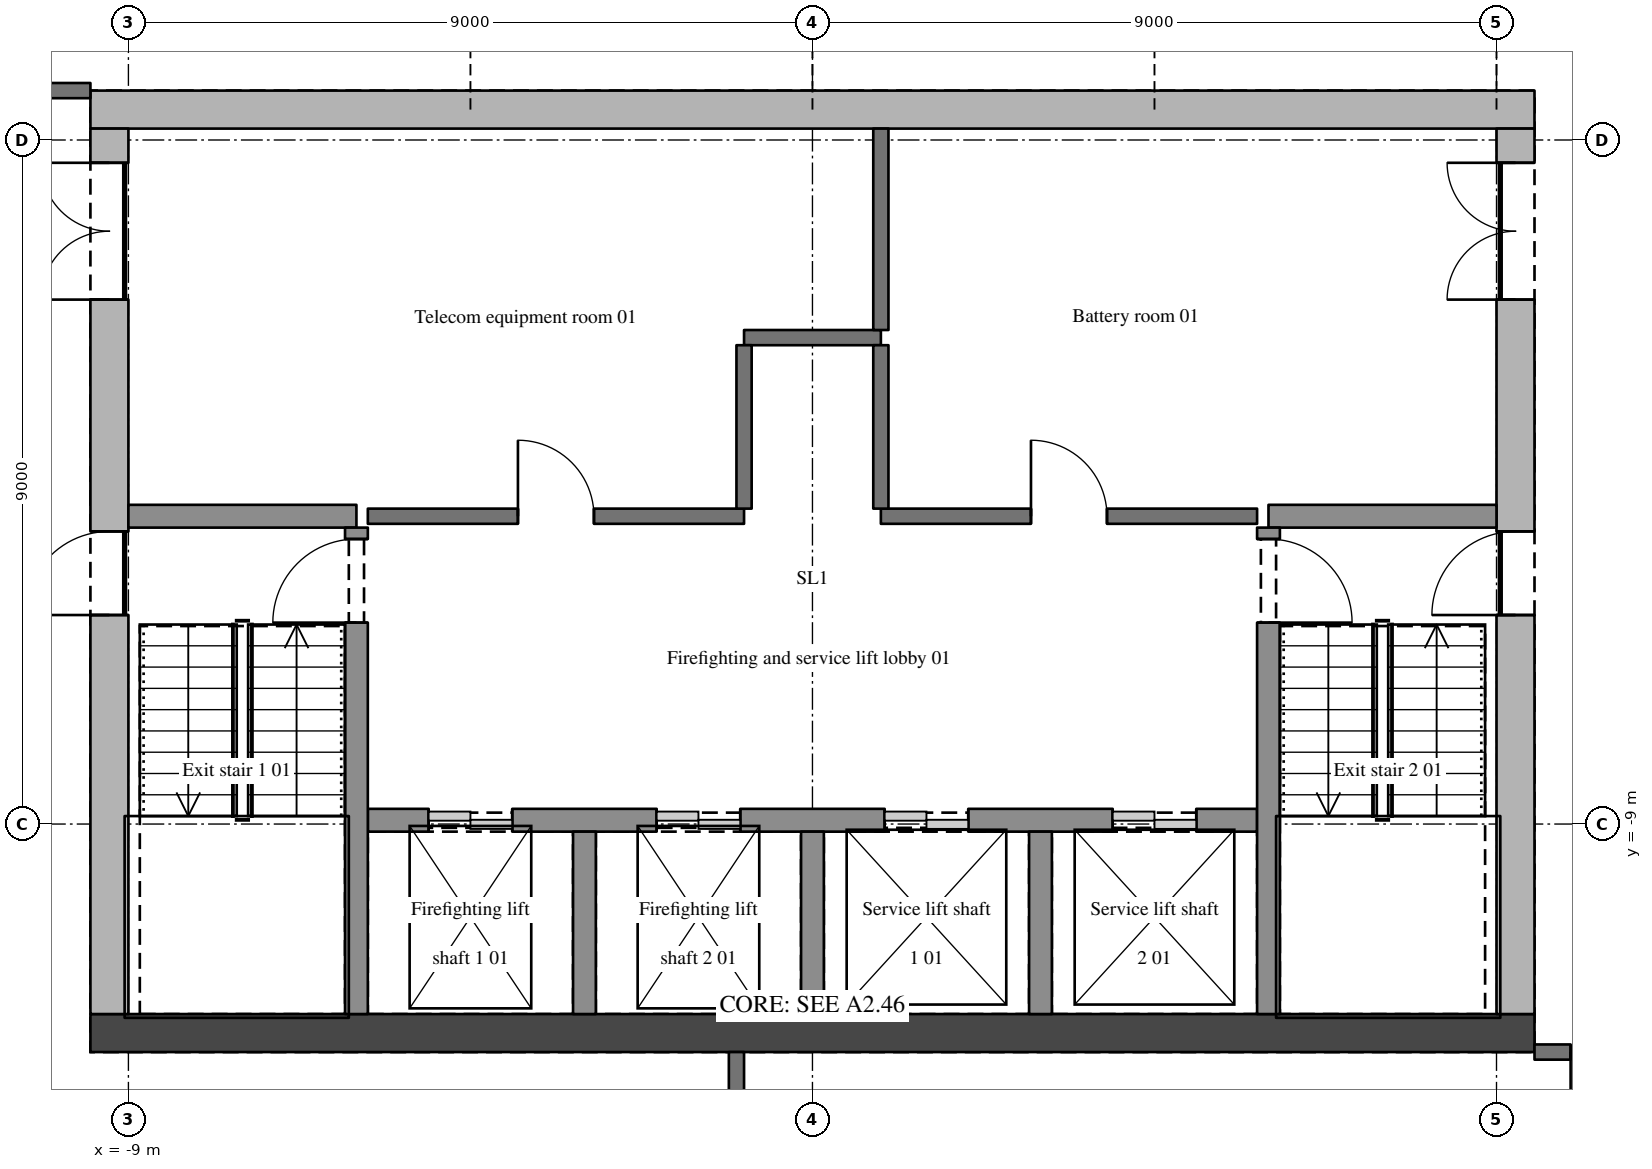
"""IFC4 building model, lengths in metres.
Left out: names, types, materials, properties, quantities, classifications, styles, units other than length and angle.
Written with IfcOpenShell. Run it as: python <this file> out.ifc"""

import sys

from ifc_helpers import new_model, si_unit, direction, frame, frame_2d, origin, place, context, subcontext, project, spatial, polyline, rectangle, outline, extrude, element, fill, save


model = new_model("IFC4")
c1 = context("Model", 3, precision=1e-05, world=origin(), true_north=direction((0.0, 1.0)))
c2 = subcontext(c1, "Body", "Model", "MODEL_VIEW")
j1 = project(units=[si_unit("LENGTHUNIT", "METRE"), si_unit("PLANEANGLEUNIT", "RADIAN")], contexts=[c1])
p1 = place(None, origin())
s1 = spatial("IfcSite", under=j1, at=p1, CompositionType="ELEMENT")
p2 = place(p1, origin())
s2 = spatial("IfcBuilding", under=s1, at=p2, CompositionType="ELEMENT")
p3 = place(p2, frame((0.0, 0.0, 304.5)))
s3 = spatial("IfcBuildingStorey", under=s2, at=p3, CompositionType="ELEMENT", Elevation=304.5)
for number, where, z_axis, x_axis in (
    (1, (-9.5, -11.75, 0.0), (0.0, 0.0, 1.0), (1.0, 0.0, 0.0)),
    (2, (-9.5, 0.4, 0.0), (0.0, 0.0, 1.0), (1.0, 0.0, 0.0)),
):
    element("IfcWall", number, at=place(p3, frame(where, z_axis=z_axis, x_axis=x_axis)), inside=s3, PredefinedType="SHEAR", context=c2, shape_type="SweptSolid", body=[
        extrude(outline(polyline([(0.0, 0.0), (19.0, 0.0), (19.0, 3.6), (0.0, 3.6), (0.0, 0.0)])), frame((0.0, 0.25, 0.0), z_axis=(0.0, -1.0, 0.0), x_axis=(1.0, 0.0, 0.0)), (0.0, 0.0, 1.0), 0.5),
    ])
p4 = place(p3, frame((-9.25, -11.5, 0.0), z_axis=(0.0, 0.0, 1.0), x_axis=(0.0, 1.0, 0.0)))
e3 = element("IfcWall", 3, at=p4, inside=s3, PredefinedType="SHEAR", context=c2, shape_type="SweptSolid", body=[
    extrude(outline(polyline([(0.0, 0.0), (11.65, 0.0), (11.65, 3.6), (0.0, 3.6), (0.0, 0.0)])), frame((0.0, 0.25, 0.0), z_axis=(0.0, -1.0, 0.0), x_axis=(1.0, 0.0, 0.0)), (0.0, 0.0, 1.0), 0.5),
])
p5 = place(p4, frame((9.4, 0.0, 0.0)))
e4 = element("IfcOpeningElement", 4, at=p5, cuts=e3, PredefinedType="OPENING", context=c2, shape_type="SweptSolid", body=[
    extrude(rectangle(XDim=1.8, YDim=2.1, at=frame_2d((0.9, 1.05))), frame((0.0, 0.26, 0.0), z_axis=(0.0, -1.0, 0.0), x_axis=(1.0, 0.0, 0.0)), (0.0, 0.0, 1.0), 0.52),
])
p6 = place(p4, frame((5.25, 0.0, 0.0)))
e5 = element("IfcOpeningElement", 5, at=p6, cuts=e3, PredefinedType="OPENING", context=c2, shape_type="SweptSolid", body=[
    extrude(rectangle(XDim=1.1, YDim=2.1, at=frame_2d((0.55, 1.05))), frame((0.0, 0.26, 0.0), z_axis=(0.0, -1.0, 0.0), x_axis=(1.0, 0.0, 0.0)), (0.0, 0.0, 1.0), 0.52),
])
p7 = place(p3, frame((9.25, -11.5, 0.0), z_axis=(0.0, 0.0, 1.0), x_axis=(0.0, 1.0, 0.0)))
e6 = element("IfcWall", 6, at=p7, inside=s3, PredefinedType="SHEAR", context=c2, shape_type="SweptSolid", body=[
    extrude(outline(polyline([(0.0, 0.0), (11.65, 0.0), (11.65, 3.6), (0.0, 3.6), (0.0, 0.0)])), frame((0.0, 0.25, 0.0), z_axis=(0.0, -1.0, 0.0), x_axis=(1.0, 0.0, 0.0)), (0.0, 0.0, 1.0), 0.5),
])
p8 = place(p7, frame((9.4, 0.0, 0.0)))
e7 = element("IfcOpeningElement", 7, at=p8, cuts=e6, PredefinedType="OPENING", context=c2, shape_type="SweptSolid", body=[
    extrude(rectangle(XDim=1.8, YDim=2.1, at=frame_2d((0.9, 1.05))), frame((0.0, 0.26, 0.0), z_axis=(0.0, -1.0, 0.0), x_axis=(1.0, 0.0, 0.0)), (0.0, 0.0, 1.0), 0.52),
])
p9 = place(p7, frame((5.25, 0.0, 0.0)))
e8 = element("IfcOpeningElement", 8, at=p9, cuts=e6, PredefinedType="OPENING", context=c2, shape_type="SweptSolid", body=[
    extrude(rectangle(XDim=1.1, YDim=2.1, at=frame_2d((0.55, 1.05))), frame((0.0, 0.26, 0.0), z_axis=(0.0, -1.0, 0.0), x_axis=(1.0, 0.0, 0.0)), (0.0, 0.0, 1.0), 0.52),
])
p10 = place(p3, frame((11.35, -12.0, 0.0), z_axis=(0.0, 0.0, 1.0), x_axis=(-1.0, 0.0, 0.0)))
e9 = element("IfcWall", 9, at=p10, inside=s3, PredefinedType="SOLIDWALL", context=c2, shape_type="SweptSolid", body=[
    extrude(rectangle(XDim=1.85, YDim=0.2, at=frame_2d((0.925, 0.0))), origin(), (0.0, 0.0, 1.0), 2.66),
])
p11 = place(p10, frame((0.475, 0.0, 0.0)))
e10 = element("IfcOpeningElement", 10, at=p11, cuts=e9, PredefinedType="OPENING", context=c2, shape_type="SweptSolid", body=[
    extrude(rectangle(XDim=0.9, YDim=2.1, at=frame_2d((0.45, 1.05))), frame((0.0, 0.11, 0.0), z_axis=(0.0, -1.0, 0.0), x_axis=(1.0, 0.0, 0.0)), (0.0, 0.0, 1.0), 0.22),
])
p12 = place(p3, frame((-5.85, -8.95, 0.0), z_axis=(0.0, 0.0, 1.0), x_axis=(1.0, 0.0, 0.0)))
e11 = element("IfcWall", 11, at=p12, inside=s3, PredefinedType="SHEAR", context=c2, shape_type="SweptSolid", body=[
    extrude(rectangle(XDim=11.7, YDim=0.3, at=frame_2d((5.85, 0.0))), origin(), (0.0, 0.0, 1.0), 3.6),
])
p13 = place(p12, frame((0.8, 0.0, 0.0)))
e12 = element("IfcOpeningElement", 12, at=p13, cuts=e11, PredefinedType="OPENING", context=c2, shape_type="SweptSolid", body=[
    extrude(rectangle(XDim=1.1, YDim=2.1, at=frame_2d((0.55, 1.05))), frame((0.0, 0.16, 0.0), z_axis=(0.0, -1.0, 0.0), x_axis=(1.0, 0.0, 0.0)), (0.0, 0.0, 1.0), 0.32),
])
p14 = place(p12, frame((3.8, 0.0, 0.0)))
e13 = element("IfcOpeningElement", 13, at=p14, cuts=e11, PredefinedType="OPENING", context=c2, shape_type="SweptSolid", body=[
    extrude(rectangle(XDim=1.1, YDim=2.1, at=frame_2d((0.55, 1.05))), frame((0.0, 0.16, 0.0), z_axis=(0.0, -1.0, 0.0), x_axis=(1.0, 0.0, 0.0)), (0.0, 0.0, 1.0), 0.32),
])
p15 = place(p12, frame((6.8, 0.0, 0.0)))
e14 = element("IfcOpeningElement", 14, at=p15, cuts=e11, PredefinedType="OPENING", context=c2, shape_type="SweptSolid", body=[
    extrude(rectangle(XDim=1.1, YDim=2.1, at=frame_2d((0.55, 1.05))), frame((0.0, 0.16, 0.0), z_axis=(0.0, -1.0, 0.0), x_axis=(1.0, 0.0, 0.0)), (0.0, 0.0, 1.0), 0.32),
])
p16 = place(p12, frame((9.8, 0.0, 0.0)))
e15 = element("IfcOpeningElement", 15, at=p16, cuts=e11, PredefinedType="OPENING", context=c2, shape_type="SweptSolid", body=[
    extrude(rectangle(XDim=1.1, YDim=2.1, at=frame_2d((0.55, 1.05))), frame((0.0, 0.16, 0.0), z_axis=(0.0, -1.0, 0.0), x_axis=(1.0, 0.0, 0.0)), (0.0, 0.0, 1.0), 0.32),
])
p17 = place(p3, frame((-9.0, -4.95, 0.0), z_axis=(0.0, 0.0, 1.0), x_axis=(1.0, 0.0, 0.0)))
e16 = element("IfcWall", 16, at=p17, inside=s3, PredefinedType="SHEAR", context=c2, shape_type="SweptSolid", body=[
    extrude(rectangle(XDim=3.0, YDim=0.3, at=frame_2d((1.5, 0.0))), origin(), (0.0, 0.0, 1.0), 3.6),
])
p18 = place(p3, frame((-5.85, -4.95, 0.0), z_axis=(0.0, 0.0, 1.0), x_axis=(1.0, 0.0, 0.0)))
e17 = element("IfcWall", 17, at=p18, inside=s3, PredefinedType="SOLIDWALL", context=c2, shape_type="SweptSolid", body=[
    extrude(rectangle(XDim=4.95, YDim=0.2, at=frame_2d((2.475, 0.0))), origin(), (0.0, 0.0, 1.0), 3.3),
])
p19 = place(p18, frame((1.975, 0.0, 0.0)))
e18 = element("IfcOpeningElement", 18, at=p19, cuts=e17, PredefinedType="OPENING", context=c2, shape_type="SweptSolid", body=[
    extrude(rectangle(XDim=1.0, YDim=2.1, at=frame_2d((0.5, 1.05))), frame((0.0, 0.11, 0.0), z_axis=(0.0, -1.0, 0.0), x_axis=(1.0, 0.0, 0.0)), (0.0, 0.0, 1.0), 0.22),
])
p20 = place(p3, frame((0.9, -4.95, 0.0), z_axis=(0.0, 0.0, 1.0), x_axis=(1.0, 0.0, 0.0)))
e19 = element("IfcWall", 19, at=p20, inside=s3, PredefinedType="SOLIDWALL", context=c2, shape_type="SweptSolid", body=[
    extrude(rectangle(XDim=4.95, YDim=0.2, at=frame_2d((2.475, 0.0))), origin(), (0.0, 0.0, 1.0), 3.3),
])
p21 = place(p20, frame((1.975, 0.0, 0.0)))
e20 = element("IfcOpeningElement", 20, at=p21, cuts=e19, PredefinedType="OPENING", context=c2, shape_type="SweptSolid", body=[
    extrude(rectangle(XDim=1.0, YDim=2.1, at=frame_2d((0.5, 1.05))), frame((0.0, 0.11, 0.0), z_axis=(0.0, -1.0, 0.0), x_axis=(1.0, 0.0, 0.0)), (0.0, 0.0, 1.0), 0.22),
])
p22 = place(p3, frame((6.0, -4.95, 0.0), z_axis=(0.0, 0.0, 1.0), x_axis=(1.0, 0.0, 0.0)))
e21 = element("IfcWall", 21, at=p22, inside=s3, PredefinedType="SHEAR", context=c2, shape_type="SweptSolid", body=[
    extrude(rectangle(XDim=3.0, YDim=0.3, at=frame_2d((1.5, 0.0))), origin(), (0.0, 0.0, 1.0), 3.6),
])
p23 = place(p3, frame((-0.9, -2.6, 0.0), z_axis=(0.0, 0.0, 1.0), x_axis=(1.0, 0.0, 0.0)))
e22 = element("IfcWall", 22, at=p23, inside=s3, PredefinedType="SOLIDWALL", context=c2, shape_type="SweptSolid", body=[
    extrude(rectangle(XDim=1.8, YDim=0.2, at=frame_2d((0.9, 0.0))), origin(), (0.0, 0.0, 1.0), 3.3),
])
p24 = place(p3, frame((-9.5, 0.65, 0.0), z_axis=(0.0, 0.0, 1.0), x_axis=(-1.0, 0.0, 0.0)))
e23 = element("IfcWall", 23, at=p24, inside=s3, PredefinedType="SOLIDWALL", context=c2, shape_type="SweptSolid", body=[
    extrude(rectangle(XDim=2.6, YDim=0.2, at=frame_2d((1.3, 0.0))), origin(), (0.0, 0.0, 1.0), 2.66),
])
p25 = place(p24, frame((0.85, 0.0, 0.0)))
e24 = element("IfcOpeningElement", 24, at=p25, cuts=e23, PredefinedType="OPENING", context=c2, shape_type="SweptSolid", body=[
    extrude(rectangle(XDim=0.9, YDim=2.1, at=frame_2d((0.45, 1.05))), frame((0.0, 0.11, 0.0), z_axis=(0.0, -1.0, 0.0), x_axis=(1.0, 0.0, 0.0)), (0.0, 0.0, 1.0), 0.22),
])
p26 = place(p3, frame((-6.0, -11.5, 0.0), z_axis=(0.0, 0.0, 1.0), x_axis=(0.0, 1.0, 0.0)))
e25 = element("IfcWall", 25, at=p26, inside=s3, PredefinedType="SHEAR", context=c2, shape_type="SweptSolid", body=[
    extrude(rectangle(XDim=6.4, YDim=0.3, at=frame_2d((3.2, 0.0))), origin(), (0.0, 0.0, 1.0), 3.6),
])
p27 = place(p26, frame((5.15, 0.0, 0.0)))
e26 = element("IfcOpeningElement", 26, at=p27, cuts=e25, PredefinedType="OPENING", context=c2, shape_type="SweptSolid", body=[
    extrude(rectangle(XDim=1.1, YDim=2.1, at=frame_2d((0.55, 1.05))), frame((0.0, 0.16, 0.0), z_axis=(0.0, -1.0, 0.0), x_axis=(1.0, 0.0, 0.0)), (0.0, 0.0, 1.0), 0.32),
])
p28 = place(p3, frame((-3.0, -11.5, 0.0), z_axis=(0.0, 0.0, 1.0), x_axis=(0.0, 1.0, 0.0)))
e27 = element("IfcWall", 27, at=p28, inside=s3, PredefinedType="SHEAR", context=c2, shape_type="SweptSolid", body=[
    extrude(rectangle(XDim=2.4, YDim=0.3, at=frame_2d((1.2, 0.0))), origin(), (0.0, 0.0, 1.0), 3.6),
])
p29 = place(p3, frame((-1.0, -13.7, 0.0), z_axis=(0.0, 0.0, 1.0), x_axis=(0.0, 1.0, 0.0)))
e28 = element("IfcWall", 28, at=p29, inside=s3, PredefinedType="SOLIDWALL", context=c2, shape_type="SweptSolid", body=[
    extrude(rectangle(XDim=1.7, YDim=0.2, at=frame_2d((0.85, 0.0))), origin(), (0.0, 0.0, 1.0), 2.66),
])
p30 = place(p3, frame((-0.9, -4.85, 0.0), z_axis=(0.0, 0.0, 1.0), x_axis=(0.0, 1.0, 0.0)))
e29 = element("IfcWall", 29, at=p30, inside=s3, PredefinedType="SOLIDWALL", context=c2, shape_type="SweptSolid", body=[
    extrude(rectangle(XDim=2.15, YDim=0.2, at=frame_2d((1.075, 0.0))), origin(), (0.0, 0.0, 1.0), 3.3),
])
p31 = place(p3, frame((0.0, -11.5, 0.0), z_axis=(0.0, 0.0, 1.0), x_axis=(0.0, 1.0, 0.0)))
e30 = element("IfcWall", 30, at=p31, inside=s3, PredefinedType="SHEAR", context=c2, shape_type="SweptSolid", body=[
    extrude(rectangle(XDim=2.4, YDim=0.3, at=frame_2d((1.2, 0.0))), origin(), (0.0, 0.0, 1.0), 3.6),
])
p32 = place(p3, frame((0.9, -4.85, 0.0), z_axis=(0.0, 0.0, 1.0), x_axis=(0.0, 1.0, 0.0)))
e31 = element("IfcWall", 31, at=p32, inside=s3, PredefinedType="SOLIDWALL", context=c2, shape_type="SweptSolid", body=[
    extrude(rectangle(XDim=2.15, YDim=0.2, at=frame_2d((1.075, 0.0))), origin(), (0.0, 0.0, 1.0), 3.3),
])
p33 = place(p3, frame((0.9, -2.5, 0.0), z_axis=(0.0, 0.0, 1.0), x_axis=(0.0, 1.0, 0.0)))
e32 = element("IfcWall", 32, at=p33, inside=s3, PredefinedType="SOLIDWALL", context=c2, shape_type="SweptSolid", body=[
    extrude(rectangle(XDim=2.65, YDim=0.2, at=frame_2d((1.325, 0.0))), origin(), (0.0, 0.0, 1.0), 2.66),
])
p34 = place(p3, frame((3.0, -11.5, 0.0), z_axis=(0.0, 0.0, 1.0), x_axis=(0.0, 1.0, 0.0)))
e33 = element("IfcWall", 33, at=p34, inside=s3, PredefinedType="SHEAR", context=c2, shape_type="SweptSolid", body=[
    extrude(rectangle(XDim=2.4, YDim=0.3, at=frame_2d((1.2, 0.0))), origin(), (0.0, 0.0, 1.0), 3.6),
])
p35 = place(p3, frame((6.0, -5.1, 0.0), z_axis=(0.0, 0.0, 1.0), x_axis=(0.0, -1.0, 0.0)))
e34 = element("IfcWall", 34, at=p35, inside=s3, PredefinedType="SHEAR", context=c2, shape_type="SweptSolid", body=[
    extrude(rectangle(XDim=6.4, YDim=0.3, at=frame_2d((3.2, 0.0))), origin(), (0.0, 0.0, 1.0), 3.6),
])
p36 = place(p35, frame((0.15, 0.0, 0.0)))
e35 = element("IfcOpeningElement", 35, at=p36, cuts=e34, PredefinedType="OPENING", context=c2, shape_type="SweptSolid", body=[
    extrude(rectangle(XDim=1.1, YDim=2.1, at=frame_2d((0.55, 1.05))), frame((0.0, 0.16, 0.0), z_axis=(0.0, -1.0, 0.0), x_axis=(1.0, 0.0, 0.0)), (0.0, 0.0, 1.0), 0.32),
])
p37 = place(p8, origin())
e36 = element("IfcDoor", 36, at=p37, inside=s3, OperationType="DOUBLE_DOOR_SINGLE_SWING", PredefinedType="DOOR", context=c2, shape_type="SweptSolid", body=[
    extrude(rectangle(XDim=1.8, YDim=2.1, at=frame_2d((0.9, 1.05))), frame((0.0, 0.025, 0.0), z_axis=(0.0, -1.0, 0.0), x_axis=(1.0, 0.0, 0.0)), (0.0, 0.0, 1.0), 0.05),
])
fill(e7, e36)
p38 = place(p21, origin())
e37 = element("IfcDoor", 37, at=p38, inside=s3, OperationType="SINGLE_SWING_LEFT", PredefinedType="DOOR", context=c2, shape_type="SweptSolid", body=[
    extrude(rectangle(XDim=1.0, YDim=2.1, at=frame_2d((0.5, 1.05))), frame((0.0, 0.025, 0.0), z_axis=(0.0, -1.0, 0.0), x_axis=(1.0, 0.0, 0.0)), (0.0, 0.0, 1.0), 0.05),
])
fill(e20, e37)
p39 = place(p19, origin())
e38 = element("IfcDoor", 38, at=p39, inside=s3, OperationType="SINGLE_SWING_LEFT", PredefinedType="DOOR", context=c2, shape_type="SweptSolid", body=[
    extrude(rectangle(XDim=1.0, YDim=2.1, at=frame_2d((0.5, 1.05))), frame((0.0, 0.025, 0.0), z_axis=(0.0, -1.0, 0.0), x_axis=(1.0, 0.0, 0.0)), (0.0, 0.0, 1.0), 0.05),
])
fill(e18, e38)
p40 = place(p5, origin())
e39 = element("IfcDoor", 39, at=p40, inside=s3, OperationType="DOUBLE_DOOR_SINGLE_SWING", PredefinedType="DOOR", context=c2, shape_type="SweptSolid", body=[
    extrude(rectangle(XDim=1.8, YDim=2.1, at=frame_2d((0.9, 1.05))), frame((0.0, 0.025, 0.0), z_axis=(0.0, -1.0, 0.0), x_axis=(1.0, 0.0, 0.0)), (0.0, 0.0, 1.0), 0.05),
])
fill(e4, e39)
p41 = place(p27, origin())
e40 = element("IfcDoor", 40, at=p41, inside=s3, OperationType="SINGLE_SWING_LEFT", PredefinedType="DOOR", context=c2, shape_type="SweptSolid", body=[
    extrude(rectangle(XDim=1.1, YDim=2.1, at=frame_2d((0.55, 1.05))), frame((0.0, 0.025, 0.0), z_axis=(0.0, -1.0, 0.0), x_axis=(1.0, 0.0, 0.0)), (0.0, 0.0, 1.0), 0.05),
])
fill(e26, e40)
p42 = place(p6, origin())
e41 = element("IfcDoor", 41, at=p42, inside=s3, OperationType="SINGLE_SWING_LEFT", PredefinedType="DOOR", context=c2, shape_type="SweptSolid", body=[
    extrude(rectangle(XDim=1.1, YDim=2.1, at=frame_2d((0.55, 1.05))), frame((0.0, 0.025, 0.0), z_axis=(0.0, -1.0, 0.0), x_axis=(1.0, 0.0, 0.0)), (0.0, 0.0, 1.0), 0.05),
])
fill(e5, e41)
p43 = place(p36, origin())
e42 = element("IfcDoor", 42, at=p43, inside=s3, OperationType="SINGLE_SWING_RIGHT", PredefinedType="DOOR", context=c2, shape_type="SweptSolid", body=[
    extrude(rectangle(XDim=1.1, YDim=2.1, at=frame_2d((0.55, 1.05))), frame((0.0, 0.025, 0.0), z_axis=(0.0, -1.0, 0.0), x_axis=(1.0, 0.0, 0.0)), (0.0, 0.0, 1.0), 0.05),
])
fill(e35, e42)
p44 = place(p9, origin())
e43 = element("IfcDoor", 43, at=p44, inside=s3, OperationType="SINGLE_SWING_LEFT", PredefinedType="DOOR", context=c2, shape_type="SweptSolid", body=[
    extrude(rectangle(XDim=1.1, YDim=2.1, at=frame_2d((0.55, 1.05))), frame((0.0, 0.025, 0.0), z_axis=(0.0, -1.0, 0.0), x_axis=(1.0, 0.0, 0.0)), (0.0, 0.0, 1.0), 0.05),
])
fill(e8, e43)
p45 = place(p11, origin())
e44 = element("IfcDoor", 44, at=p45, inside=s3, OperationType="SINGLE_SWING_RIGHT", PredefinedType="DOOR", context=c2, shape_type="SweptSolid", body=[
    extrude(rectangle(XDim=0.9, YDim=2.1, at=frame_2d((0.45, 1.05))), frame((0.0, 0.025, 0.0), z_axis=(0.0, -1.0, 0.0), x_axis=(1.0, 0.0, 0.0)), (0.0, 0.0, 1.0), 0.05),
])
fill(e10, e44)
p46 = place(p13, origin())
e45 = element("IfcDoor", 45, at=p46, inside=s3, OperationType="DOUBLE_DOOR_SLIDING", PredefinedType="DOOR", context=c2, shape_type="SweptSolid", body=[
    extrude(rectangle(XDim=1.1, YDim=2.1, at=frame_2d((0.55, 1.05))), frame((0.0, 0.025, 0.0), z_axis=(0.0, -1.0, 0.0), x_axis=(1.0, 0.0, 0.0)), (0.0, 0.0, 1.0), 0.05),
])
fill(e12, e45)
p47 = place(p14, origin())
e46 = element("IfcDoor", 46, at=p47, inside=s3, OperationType="DOUBLE_DOOR_SLIDING", PredefinedType="DOOR", context=c2, shape_type="SweptSolid", body=[
    extrude(rectangle(XDim=1.1, YDim=2.1, at=frame_2d((0.55, 1.05))), frame((0.0, 0.025, 0.0), z_axis=(0.0, -1.0, 0.0), x_axis=(1.0, 0.0, 0.0)), (0.0, 0.0, 1.0), 0.05),
])
fill(e13, e46)
p48 = place(p15, origin())
e47 = element("IfcDoor", 47, at=p48, inside=s3, OperationType="DOUBLE_DOOR_SLIDING", PredefinedType="DOOR", context=c2, shape_type="SweptSolid", body=[
    extrude(rectangle(XDim=1.1, YDim=2.1, at=frame_2d((0.55, 1.05))), frame((0.0, 0.025, 0.0), z_axis=(0.0, -1.0, 0.0), x_axis=(1.0, 0.0, 0.0)), (0.0, 0.0, 1.0), 0.05),
])
fill(e14, e47)
p49 = place(p16, origin())
e48 = element("IfcDoor", 48, at=p49, inside=s3, OperationType="DOUBLE_DOOR_SLIDING", PredefinedType="DOOR", context=c2, shape_type="SweptSolid", body=[
    extrude(rectangle(XDim=1.1, YDim=2.1, at=frame_2d((0.55, 1.05))), frame((0.0, 0.025, 0.0), z_axis=(0.0, -1.0, 0.0), x_axis=(1.0, 0.0, 0.0)), (0.0, 0.0, 1.0), 0.05),
])
fill(e15, e48)
save(model, sys.argv[1])
